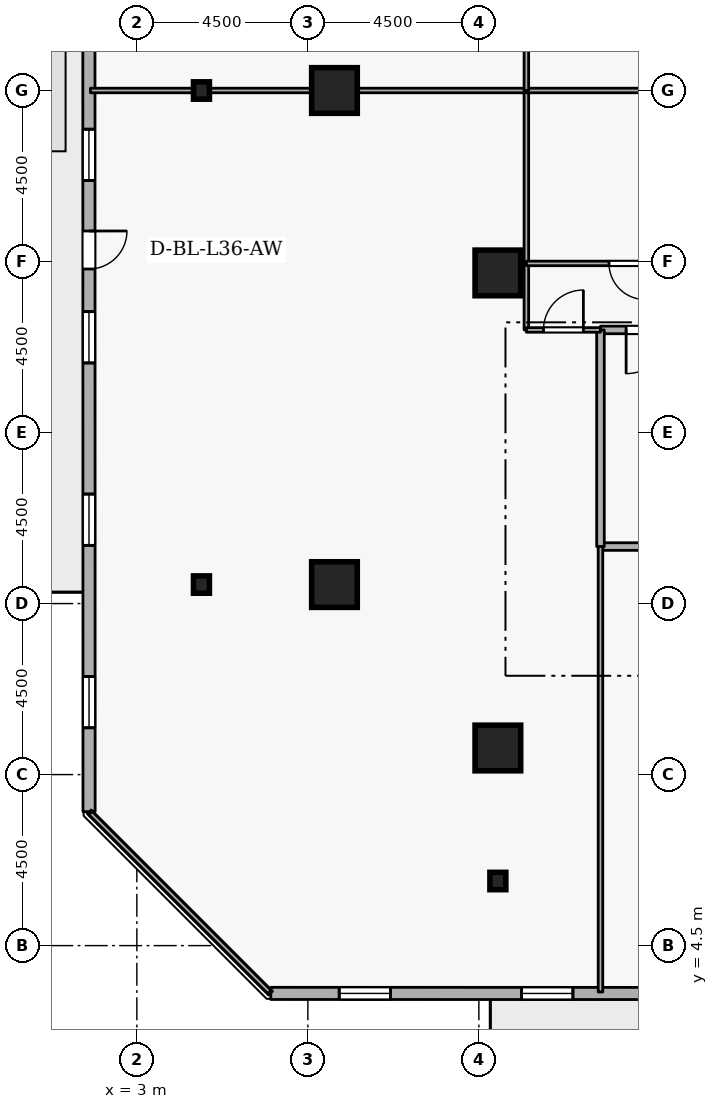
"""IFC4 building model, lengths in metres.
Left out: names, types, materials, properties, quantities, classifications, styles, units other than length and angle.
Written with IfcOpenShell. Run it as: python <this file> out.ifc"""

import sys

from ifc_helpers import new_model, si_unit, direction, frame, frame_2d, origin, origin_2d, place, context, subcontext, project, spatial, rectangle, i_section, extrude, element, fill, save


model = new_model("IFC4")
c1 = context("Model", 3, precision=1e-05, world=origin(), true_north=direction((0.0, 1.0)))
c2 = subcontext(c1, "Body", "Model", "MODEL_VIEW")
j1 = project(units=[si_unit("LENGTHUNIT", "METRE"), si_unit("PLANEANGLEUNIT", "RADIAN")], contexts=[c1])
p1 = place(None, origin())
s1 = spatial("IfcSite", under=j1, at=p1, CompositionType="ELEMENT")
p2 = place(p1, origin())
s2 = spatial("IfcBuilding", under=s1, at=p2, CompositionType="ELEMENT")
p3 = place(p2, frame((0.0, 0.0, 137.7)))
s3 = spatial("IfcBuildingStorey", under=s2, at=p3, CompositionType="ELEMENT", Elevation=137.7)
for number, where, z_axis, x_axis in (
    (1, (12.5, 9.7, 0.0), (0.0, 0.0, 1.0), (1.0, 0.0, 0.0)),
    (2, (8.2, 14.0, 0.0), (0.0, 0.0, 1.0), (1.0, 0.0, 0.0)),
    (3, (8.2, 27.0, 0.0), (0.0, 0.0, 1.0), (1.0, 0.0, 0.0)),
    (4, (12.5, 22.2, 0.0), (0.0, 0.0, 1.0), (1.0, 0.0, 0.0)),
):
    element("IfcColumn", number, at=place(p3, frame(where, z_axis=z_axis, x_axis=x_axis)), inside=s3, PredefinedType="COLUMN", context=c2, shape_type="SweptSolid", body=[
        extrude(rectangle(XDim=1.2, YDim=1.2, at=origin_2d()), origin(), (0.0, 0.0, 1.0), 3.6),
    ])
for number, where, z_axis, x_axis in (
    (5, (12.5, 6.2, 0.0), (0.0, 0.0, 1.0), (1.0, 0.0, 0.0)),
    (6, (4.7, 14.0, 0.0), (0.0, 0.0, 1.0), (1.0, 0.0, 0.0)),
    (7, (4.7, 27.0, 0.0), (0.0, 0.0, 1.0), (1.0, 0.0, 0.0)),
):
    element("IfcColumn", number, at=place(p3, frame(where, z_axis=z_axis, x_axis=x_axis)), inside=s3, PredefinedType="COLUMN", context=c2, shape_type="SweptSolid", body=[
        extrude(i_section(OverallWidth=0.418, OverallDepth=0.456, WebThickness=0.042, FlangeThickness=0.067, FilletRadius=0.015, at=origin_2d()), origin(), (0.0, 0.0, 1.0), 3.6),
    ])
p4 = place(p3, frame((6.525, 3.243, 0.0), z_axis=(0.0, 0.0, 1.0), x_axis=(0.99999997701, -0.000214431216, 0.0)))
e8 = element("IfcWall", 8, at=p4, inside=s3, PredefinedType="STANDARD", context=c2, shape_type="SweptSolid", body=[
    extrude(rectangle(XDim=34.156, YDim=0.32, at=frame_2d((17.078, 0.0))), origin(), (0.0, 0.0, 1.0), 2.66),
])
p5 = place(p4, frame((27.428, 0.0, 0.0)))
e9 = element("IfcOpeningElement", 9, at=p5, cuts=e8, PredefinedType="OPENING", context=c2, shape_type="SweptSolid", body=[
    extrude(rectangle(XDim=1.0, YDim=2.08, at=frame_2d((0.5, 1.04))), frame((0.0, 0.17, 0.0), z_axis=(0.0, -1.0, 0.0), x_axis=(1.0, 0.0, 0.0)), (0.0, 0.0, 1.0), 0.34),
])
p6 = place(p4, frame((1.8, 0.0, 0.72)))
e10 = element("IfcOpeningElement", 10, at=p6, cuts=e8, PredefinedType="OPENING", context=c2, shape_type="SweptSolid", body=[
    extrude(rectangle(XDim=1.35, YDim=1.05, at=frame_2d((0.675, 0.525))), frame((0.0, 0.17, 0.0), z_axis=(0.0, -1.0, 0.0), x_axis=(1.0, 0.0, 0.0)), (0.0, 0.0, 1.0), 0.34),
])
p7 = place(p4, frame((6.6, 0.0, 0.72)))
e11 = element("IfcOpeningElement", 11, at=p7, cuts=e8, PredefinedType="OPENING", context=c2, shape_type="SweptSolid", body=[
    extrude(rectangle(XDim=1.35, YDim=1.05, at=frame_2d((0.675, 0.525))), frame((0.0, 0.17, 0.0), z_axis=(0.0, -1.0, 0.0), x_axis=(1.0, 0.0, 0.0)), (0.0, 0.0, 1.0), 0.34),
])
p8 = place(p4, frame((11.4, 0.0, 0.72)))
e12 = element("IfcOpeningElement", 12, at=p8, cuts=e8, PredefinedType="OPENING", context=c2, shape_type="SweptSolid", body=[
    extrude(rectangle(XDim=1.35, YDim=1.05, at=frame_2d((0.675, 0.525))), frame((0.0, 0.17, 0.0), z_axis=(0.0, -1.0, 0.0), x_axis=(1.0, 0.0, 0.0)), (0.0, 0.0, 1.0), 0.34),
])
p9 = place(p4, frame((16.2, 0.0, 0.72)))
e13 = element("IfcOpeningElement", 13, at=p9, cuts=e8, PredefinedType="OPENING", context=c2, shape_type="SweptSolid", body=[
    extrude(rectangle(XDim=1.35, YDim=1.05, at=frame_2d((0.675, 0.525))), frame((0.0, 0.17, 0.0), z_axis=(0.0, -1.0, 0.0), x_axis=(1.0, 0.0, 0.0)), (0.0, 0.0, 1.0), 0.34),
])
p10 = place(p4, frame((21.0, 0.0, 0.72)))
e14 = element("IfcOpeningElement", 14, at=p10, cuts=e8, PredefinedType="OPENING", context=c2, shape_type="SweptSolid", body=[
    extrude(rectangle(XDim=1.35, YDim=1.05, at=frame_2d((0.675, 0.525))), frame((0.0, 0.17, 0.0), z_axis=(0.0, -1.0, 0.0), x_axis=(1.0, 0.0, 0.0)), (0.0, 0.0, 1.0), 0.34),
])
p11 = place(p4, frame((30.6, 0.0, 0.72)))
e15 = element("IfcOpeningElement", 15, at=p11, cuts=e8, PredefinedType="OPENING", context=c2, shape_type="SweptSolid", body=[
    extrude(rectangle(XDim=1.35, YDim=1.05, at=frame_2d((0.675, 0.525))), frame((0.0, 0.17, 0.0), z_axis=(0.0, -1.0, 0.0), x_axis=(1.0, 0.0, 0.0)), (0.0, 0.0, 1.0), 0.34),
])
p12 = place(p3, frame((1.735, 42.181, 0.0), z_axis=(0.0, 0.0, 1.0), x_axis=(0.000214431216, -0.99999997701, 0.0)))
e16 = element("IfcWall", 16, at=p12, inside=s3, PredefinedType="STANDARD", context=c2, shape_type="SweptSolid", body=[
    extrude(rectangle(XDim=34.156, YDim=0.32, at=frame_2d((17.078, 0.0))), origin(), (0.0, 0.0, 1.0), 2.66),
])
p13 = place(p12, frame((18.878, 0.0, 0.0)))
e17 = element("IfcOpeningElement", 17, at=p13, cuts=e16, PredefinedType="OPENING", context=c2, shape_type="SweptSolid", body=[
    extrude(rectangle(XDim=1.0, YDim=2.08, at=frame_2d((0.5, 1.04))), frame((0.0, 0.17, 0.0), z_axis=(0.0, -1.0, 0.0), x_axis=(1.0, 0.0, 0.0)), (0.0, 0.0, 1.0), 0.34),
])
p14 = place(p12, frame((1.8, 0.0, 0.72)))
e18 = element("IfcOpeningElement", 18, at=p14, cuts=e16, PredefinedType="OPENING", context=c2, shape_type="SweptSolid", body=[
    extrude(rectangle(XDim=1.35, YDim=1.05, at=frame_2d((0.675, 0.525))), frame((0.0, 0.17, 0.0), z_axis=(0.0, -1.0, 0.0), x_axis=(1.0, 0.0, 0.0)), (0.0, 0.0, 1.0), 0.34),
])
p15 = place(p12, frame((6.6, 0.0, 0.72)))
e19 = element("IfcOpeningElement", 19, at=p15, cuts=e16, PredefinedType="OPENING", context=c2, shape_type="SweptSolid", body=[
    extrude(rectangle(XDim=1.35, YDim=1.05, at=frame_2d((0.675, 0.525))), frame((0.0, 0.17, 0.0), z_axis=(0.0, -1.0, 0.0), x_axis=(1.0, 0.0, 0.0)), (0.0, 0.0, 1.0), 0.34),
])
p16 = place(p12, frame((11.4, 0.0, 0.72)))
e20 = element("IfcOpeningElement", 20, at=p16, cuts=e16, PredefinedType="OPENING", context=c2, shape_type="SweptSolid", body=[
    extrude(rectangle(XDim=1.35, YDim=1.05, at=frame_2d((0.675, 0.525))), frame((0.0, 0.17, 0.0), z_axis=(0.0, -1.0, 0.0), x_axis=(1.0, 0.0, 0.0)), (0.0, 0.0, 1.0), 0.34),
])
p17 = place(p12, frame((16.2, 0.0, 0.72)))
e21 = element("IfcOpeningElement", 21, at=p17, cuts=e16, PredefinedType="OPENING", context=c2, shape_type="SweptSolid", body=[
    extrude(rectangle(XDim=1.35, YDim=1.05, at=frame_2d((0.675, 0.525))), frame((0.0, 0.17, 0.0), z_axis=(0.0, -1.0, 0.0), x_axis=(1.0, 0.0, 0.0)), (0.0, 0.0, 1.0), 0.34),
])
p18 = place(p12, frame((21.0, 0.0, 0.72)))
e22 = element("IfcOpeningElement", 22, at=p18, cuts=e16, PredefinedType="OPENING", context=c2, shape_type="SweptSolid", body=[
    extrude(rectangle(XDim=1.35, YDim=1.05, at=frame_2d((0.675, 0.525))), frame((0.0, 0.17, 0.0), z_axis=(0.0, -1.0, 0.0), x_axis=(1.0, 0.0, 0.0)), (0.0, 0.0, 1.0), 0.34),
])
p19 = place(p12, frame((25.8, 0.0, 0.72)))
e23 = element("IfcOpeningElement", 23, at=p19, cuts=e16, PredefinedType="OPENING", context=c2, shape_type="SweptSolid", body=[
    extrude(rectangle(XDim=1.35, YDim=1.05, at=frame_2d((0.675, 0.525))), frame((0.0, 0.17, 0.0), z_axis=(0.0, -1.0, 0.0), x_axis=(1.0, 0.0, 0.0)), (0.0, 0.0, 1.0), 0.34),
])
p20 = place(p12, frame((30.6, 0.0, 0.72)))
e24 = element("IfcOpeningElement", 24, at=p20, cuts=e16, PredefinedType="OPENING", context=c2, shape_type="SweptSolid", body=[
    extrude(rectangle(XDim=1.35, YDim=1.05, at=frame_2d((0.675, 0.525))), frame((0.0, 0.17, 0.0), z_axis=(0.0, -1.0, 0.0), x_axis=(1.0, 0.0, 0.0)), (0.0, 0.0, 1.0), 0.34),
])
p21 = place(p3, frame((15.2, 15.0, 0.0), z_axis=(0.0, 0.0, 1.0), x_axis=(1.0, 0.0, 0.0)))
e25 = element("IfcWall", 25, at=p21, inside=s3, PredefinedType="STANDARD", context=c2, shape_type="SweptSolid", body=[
    extrude(rectangle(XDim=2.5, YDim=0.2, at=frame_2d((1.25, 0.0))), origin(), (0.0, 0.0, 1.0), 3.26),
])
p22 = place(p3, frame((17.7, 20.7, 0.0), z_axis=(0.0, 0.0, 1.0), x_axis=(-1.0, 0.0, 0.0)))
e26 = element("IfcWall", 26, at=p22, inside=s3, PredefinedType="STANDARD", context=c2, shape_type="SweptSolid", body=[
    extrude(rectangle(XDim=2.5, YDim=0.2, at=frame_2d((1.25, 0.0))), origin(), (0.0, 0.0, 1.0), 3.26),
])
p23 = place(p22, frame((0.675, 0.0, 0.0)))
e27 = element("IfcOpeningElement", 27, at=p23, cuts=e26, PredefinedType="OPENING", context=c2, shape_type="SweptSolid", body=[
    extrude(rectangle(XDim=1.15, YDim=2.1, at=frame_2d((0.575, 1.05))), frame((0.0, 0.11, 0.0), z_axis=(0.0, -1.0, 0.0), x_axis=(1.0, 0.0, 0.0)), (0.0, 0.0, 1.0), 0.22),
])
p24 = place(p3, frame((15.2, 20.7, 0.0), z_axis=(0.0, 0.0, 1.0), x_axis=(0.0, -1.0, 0.0)))
e28 = element("IfcWall", 28, at=p24, inside=s3, PredefinedType="STANDARD", context=c2, shape_type="SweptSolid", body=[
    extrude(rectangle(XDim=5.7, YDim=0.2, at=frame_2d((2.85, 0.0))), origin(), (0.0, 0.0, 1.0), 3.26),
])
p25 = place(p3, frame((13.25, 22.45, 0.0), z_axis=(0.0, 0.0, 1.0), x_axis=(0.0, -1.0, 0.0)))
e29 = element("IfcWall", 29, at=p25, inside=s3, PredefinedType="PARTITIONING", context=c2, shape_type="SweptSolid", body=[
    extrude(rectangle(XDim=1.75, YDim=0.12, at=frame_2d((0.875, 0.0))), origin(), (0.0, 0.0, 1.0), 3.26),
])
p26 = place(p3, frame((13.25, 20.7, 0.0), z_axis=(0.0, 0.0, 1.0), x_axis=(1.0, 0.0, 0.0)))
e30 = element("IfcWall", 30, at=p26, inside=s3, PredefinedType="PARTITIONING", context=c2, shape_type="SweptSolid", body=[
    extrude(rectangle(XDim=1.95, YDim=0.12, at=frame_2d((0.975, 0.0))), origin(), (0.0, 0.0, 1.0), 3.26),
])
p27 = place(p26, frame((0.45, 0.0, 0.0)))
e31 = element("IfcOpeningElement", 31, at=p27, cuts=e30, PredefinedType="OPENING", context=c2, shape_type="SweptSolid", body=[
    extrude(rectangle(XDim=1.05, YDim=2.1, at=frame_2d((0.525, 1.05))), frame((0.0, 0.07, 0.0), z_axis=(0.0, -1.0, 0.0), x_axis=(1.0, 0.0, 0.0)), (0.0, 0.0, 1.0), 0.14),
])
p28 = place(p3, frame((15.2, 15.0, 0.0), z_axis=(0.0, 0.0, 1.0), x_axis=(0.0, -1.0, 0.0)))
e32 = element("IfcWall", 32, at=p28, inside=s3, PredefinedType="PARTITIONING", context=c2, shape_type="SweptSolid", body=[
    extrude(rectangle(XDim=11.72, YDim=0.12, at=frame_2d((5.86, 0.0))), origin(), (0.0, 0.0, 1.0), 3.26),
])
p29 = place(p3, frame((6.49, 3.28, 0.0), z_axis=(0.0, 0.0, 1.0), x_axis=(-0.707106781187, 0.707106781187, 0.0)))
e33 = element("IfcWall", 33, at=p29, inside=s3, PredefinedType="PARTITIONING", context=c2, shape_type="SweptSolid", body=[
    extrude(rectangle(XDim=6.66, YDim=0.12, at=frame_2d((3.33, 0.0))), origin(), (0.0, 0.0, 1.0), 3.26),
])
p30 = place(p3, frame((1.78, 27.0, 0.0), z_axis=(0.0, 0.0, 1.0), x_axis=(1.0, 0.0, 0.0)))
e34 = element("IfcWall", 34, at=p30, inside=s3, PredefinedType="PARTITIONING", context=c2, shape_type="SweptSolid", body=[
    extrude(rectangle(XDim=11.47, YDim=0.12, at=frame_2d((5.735, 0.0))), origin(), (0.0, 0.0, 1.0), 2.802),
])
p31 = place(p3, frame((13.25, 27.0, 0.0), z_axis=(0.0, 0.0, 1.0), x_axis=(0.0, -1.0, 0.0)))
e35 = element("IfcWall", 35, at=p31, inside=s3, PredefinedType="PARTITIONING", context=c2, shape_type="SweptSolid", body=[
    extrude(rectangle(XDim=4.55, YDim=0.12, at=frame_2d((2.275, 0.0))), origin(), (0.0, 0.0, 1.0), 3.26),
])
p32 = place(p3, frame((13.25, 27.0, 0.0), z_axis=(0.0, 0.0, 1.0), x_axis=(1.0, 0.0, 0.0)))
e36 = element("IfcWall", 36, at=p32, inside=s3, PredefinedType="PARTITIONING", context=c2, shape_type="SweptSolid", body=[
    extrude(rectangle(XDim=5.3, YDim=0.12, at=frame_2d((2.65, 0.0))), origin(), (0.0, 0.0, 1.0), 3.26),
])
p33 = place(p3, frame((18.55, 22.45, 0.0), z_axis=(0.0, 0.0, 1.0), x_axis=(-1.0, 0.0, 0.0)))
e37 = element("IfcWall", 37, at=p33, inside=s3, PredefinedType="PARTITIONING", context=c2, shape_type="SweptSolid", body=[
    extrude(rectangle(XDim=5.3, YDim=0.12, at=frame_2d((2.65, 0.0))), origin(), (0.0, 0.0, 1.0), 3.26),
])
p34 = place(p33, frame((2.175, 0.0, 0.0)))
e38 = element("IfcOpeningElement", 38, at=p34, cuts=e37, PredefinedType="OPENING", context=c2, shape_type="SweptSolid", body=[
    extrude(rectangle(XDim=0.95, YDim=2.1, at=frame_2d((0.475, 1.05))), frame((0.0, 0.07, 0.0), z_axis=(0.0, -1.0, 0.0), x_axis=(1.0, 0.0, 0.0)), (0.0, 0.0, 1.0), 0.14),
])
p35 = place(p3, frame((13.25, 27.0, 0.0), z_axis=(0.0, 0.0, 1.0), x_axis=(0.0, 1.0, 0.0)))
e39 = element("IfcWall", 39, at=p35, inside=s3, PredefinedType="PARTITIONING", context=c2, shape_type="SweptSolid", body=[
    extrude(rectangle(XDim=2.3, YDim=0.12, at=frame_2d((1.15, 0.0))), origin(), (0.0, 0.0, 1.0), 3.26),
])
p36 = place(p6, origin())
e40 = element("IfcWindow", 40, at=p36, inside=s3, PartitioningType="SINGLE_PANEL", PredefinedType="WINDOW", context=c2, shape_type="SweptSolid", body=[
    extrude(rectangle(XDim=1.35, YDim=1.05, at=frame_2d((0.675, 0.525))), frame((0.0, 0.03, 0.0), z_axis=(0.0, -1.0, 0.0), x_axis=(1.0, 0.0, 0.0)), (0.0, 0.0, 1.0), 0.06),
])
fill(e10, e40)
p37 = place(p7, origin())
e41 = element("IfcWindow", 41, at=p37, inside=s3, PartitioningType="SINGLE_PANEL", PredefinedType="WINDOW", context=c2, shape_type="SweptSolid", body=[
    extrude(rectangle(XDim=1.35, YDim=1.05, at=frame_2d((0.675, 0.525))), frame((0.0, 0.03, 0.0), z_axis=(0.0, -1.0, 0.0), x_axis=(1.0, 0.0, 0.0)), (0.0, 0.0, 1.0), 0.06),
])
fill(e11, e41)
p38 = place(p13, origin())
e42 = element("IfcDoor", 42, at=p38, inside=s3, OperationType="SINGLE_SWING_LEFT", PredefinedType="DOOR", context=c2, shape_type="SweptSolid", body=[
    extrude(rectangle(XDim=1.0, YDim=2.08, at=frame_2d((0.5, 1.04))), frame((0.0, 0.025, 0.0), z_axis=(0.0, -1.0, 0.0), x_axis=(1.0, 0.0, 0.0)), (0.0, 0.0, 1.0), 0.05),
])
fill(e17, e42)
p39 = place(p17, origin())
e43 = element("IfcWindow", 43, at=p39, inside=s3, PartitioningType="SINGLE_PANEL", PredefinedType="WINDOW", context=c2, shape_type="SweptSolid", body=[
    extrude(rectangle(XDim=1.35, YDim=1.05, at=frame_2d((0.675, 0.525))), frame((0.0, 0.03, 0.0), z_axis=(0.0, -1.0, 0.0), x_axis=(1.0, 0.0, 0.0)), (0.0, 0.0, 1.0), 0.06),
])
fill(e21, e43)
p40 = place(p18, origin())
e44 = element("IfcWindow", 44, at=p40, inside=s3, PartitioningType="SINGLE_PANEL", PredefinedType="WINDOW", context=c2, shape_type="SweptSolid", body=[
    extrude(rectangle(XDim=1.35, YDim=1.05, at=frame_2d((0.675, 0.525))), frame((0.0, 0.03, 0.0), z_axis=(0.0, -1.0, 0.0), x_axis=(1.0, 0.0, 0.0)), (0.0, 0.0, 1.0), 0.06),
])
fill(e22, e44)
p41 = place(p19, origin())
e45 = element("IfcWindow", 45, at=p41, inside=s3, PartitioningType="SINGLE_PANEL", PredefinedType="WINDOW", context=c2, shape_type="SweptSolid", body=[
    extrude(rectangle(XDim=1.35, YDim=1.05, at=frame_2d((0.675, 0.525))), frame((0.0, 0.03, 0.0), z_axis=(0.0, -1.0, 0.0), x_axis=(1.0, 0.0, 0.0)), (0.0, 0.0, 1.0), 0.06),
])
fill(e23, e45)
p42 = place(p20, origin())
e46 = element("IfcWindow", 46, at=p42, inside=s3, PartitioningType="SINGLE_PANEL", PredefinedType="WINDOW", context=c2, shape_type="SweptSolid", body=[
    extrude(rectangle(XDim=1.35, YDim=1.05, at=frame_2d((0.675, 0.525))), frame((0.0, 0.03, 0.0), z_axis=(0.0, -1.0, 0.0), x_axis=(1.0, 0.0, 0.0)), (0.0, 0.0, 1.0), 0.06),
])
fill(e24, e46)
p43 = place(p23, origin())
e47 = element("IfcDoor", 47, at=p43, inside=s3, OperationType="SINGLE_SWING_RIGHT", PredefinedType="DOOR", context=c2, shape_type="SweptSolid", body=[
    extrude(rectangle(XDim=1.15, YDim=2.1, at=frame_2d((0.575, 1.05))), frame((0.0, 0.025, 0.0), z_axis=(0.0, -1.0, 0.0), x_axis=(1.0, 0.0, 0.0)), (0.0, 0.0, 1.0), 0.05),
])
fill(e27, e47)
p44 = place(p27, origin())
e48 = element("IfcDoor", 48, at=p44, inside=s3, OperationType="SINGLE_SWING_RIGHT", PredefinedType="DOOR", context=c2, shape_type="SweptSolid", body=[
    extrude(rectangle(XDim=1.05, YDim=2.1, at=frame_2d((0.525, 1.05))), frame((0.0, 0.025, 0.0), z_axis=(0.0, -1.0, 0.0), x_axis=(1.0, 0.0, 0.0)), (0.0, 0.0, 1.0), 0.05),
])
fill(e31, e48)
p45 = place(p34, origin())
e49 = element("IfcDoor", 49, at=p45, inside=s3, OperationType="SINGLE_SWING_LEFT", PredefinedType="DOOR", context=c2, shape_type="SweptSolid", body=[
    extrude(rectangle(XDim=0.95, YDim=2.1, at=frame_2d((0.475, 1.05))), frame((0.0, 0.025, 0.0), z_axis=(0.0, -1.0, 0.0), x_axis=(1.0, 0.0, 0.0)), (0.0, 0.0, 1.0), 0.05),
])
fill(e38, e49)
save(model, sys.argv[1])
